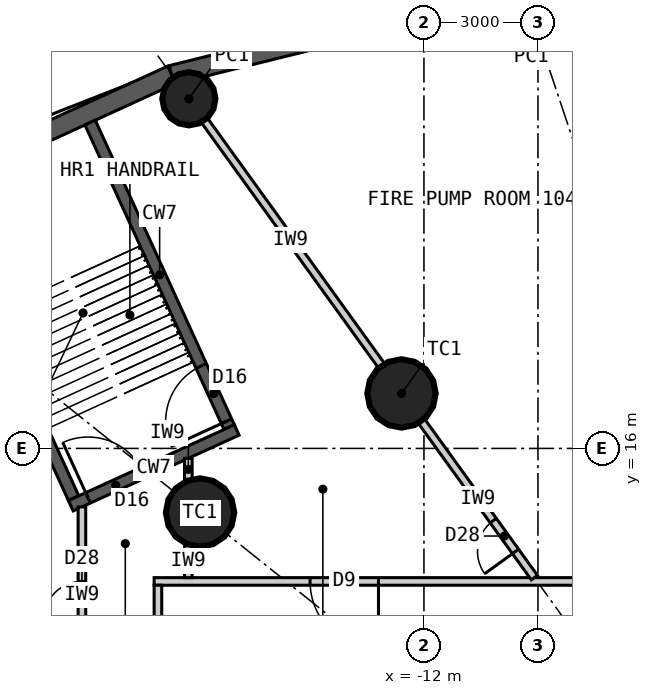
"""IFC4 building model, lengths in metres.
Left out: names, types, materials, properties, quantities, classifications, styles, units other than length and angle.
Written with IfcOpenShell. Run it as: python <this file> out.ifc"""

import sys

from ifc_helpers import new_model, si_unit, direction, frame, frame_2d, origin, origin_2d, place, context, subcontext, project, spatial, rectangle, circle, extrude, element, fill, save


model = new_model("IFC4")
c1 = context("Model", 3, precision=1e-05, world=origin(), true_north=direction((0.0, 1.0)))
c2 = subcontext(c1, "Body", "Model", "MODEL_VIEW")
j1 = project(units=[si_unit("LENGTHUNIT", "METRE"), si_unit("PLANEANGLEUNIT", "RADIAN")], contexts=[c1])
p1 = place(None, origin())
s1 = spatial("IfcSite", under=j1, at=p1, CompositionType="ELEMENT")
p2 = place(p1, origin())
s2 = spatial("IfcBuilding", under=s1, at=p2, CompositionType="ELEMENT")
p3 = place(p2, frame((0.0, 0.0, -6.0)))
s3 = spatial("IfcBuildingStorey", under=s2, at=p3, CompositionType="ELEMENT", Elevation=-6.0)
for number, where, z_axis, x_axis in (
    (1, (-12.591, 17.447, 0.0), (0.0, 0.0, 1.0), (1.0, 0.0, 0.0)),
    (2, (-17.892, 14.313, 0.0), (0.0, 0.0, 1.0), (1.0, 0.0, 0.0)),
):
    element("IfcColumn", number, at=place(p3, frame(where, z_axis=z_axis, x_axis=x_axis)), inside=s3, PredefinedType="COLUMN", context=c2, shape_type="SweptSolid", body=[
        extrude(circle(Radius=0.9, at=origin_2d()), origin(), (0.0, 0.0, 1.0), 6.0),
    ])
p4 = place(p3, frame((-18.186, 25.199, 0.0), z_axis=(0.0, 0.0, 1.0), x_axis=(1.0, 0.0, 0.0)))
e3 = element("IfcColumn", 3, at=p4, inside=s3, PredefinedType="COLUMN", context=c2, shape_type="SweptSolid", body=[
    extrude(circle(Radius=0.7, at=origin_2d()), origin(), (0.0, 0.0, 1.0), 6.0),
])
p5 = place(p3, frame((-9.415, 28.11, 0.0), z_axis=(0.0, 0.0, 1.0), x_axis=(-0.97078133687, -0.239965822533, 0.0)))
e4 = element("IfcWall", 4, at=p5, inside=s3, PredefinedType="SOLIDWALL", context=c2, shape_type="SweptSolid", body=[
    extrude(rectangle(XDim=9.503, YDim=0.5, at=frame_2d((4.752, 0.0))), origin(), (0.0, 0.0, 1.0), 5.75),
])
p6 = place(p3, frame((-18.641, 25.83, 0.0), z_axis=(0.0, 0.0, 1.0), x_axis=(-0.909171365198, -0.416422176047, 0.0)))
e5 = element("IfcWall", 5, at=p6, inside=s3, PredefinedType="SOLIDWALL", context=c2, shape_type="SweptSolid", body=[
    extrude(rectangle(XDim=9.545, YDim=0.5, at=frame_2d((4.772, 0.0))), origin(), (0.0, 0.0, 1.0), 5.75),
])
p7 = place(p3, frame((-19.1, 12.5, 0.0), z_axis=(0.0, 0.0, 1.0), x_axis=(1.0, 0.0, 0.0)))
e6 = element("IfcWall", 6, at=p7, inside=s3, PredefinedType="PARTITIONING", context=c2, shape_type="SweptSolid", body=[
    extrude(rectangle(XDim=38.2, YDim=0.2, at=frame_2d((19.1, 0.0))), origin(), (0.0, 0.0, 1.0), 5.75),
])
p8 = place(p7, frame((25.92, 0.0, 0.0)))
e7 = element("IfcOpeningElement", 7, at=p8, cuts=e6, PredefinedType="OPENING", context=c2, shape_type="SweptSolid", body=[
    extrude(rectangle(XDim=1.8, YDim=2.4, at=frame_2d((0.9, 1.2))), frame((0.0, 0.11, 0.0), z_axis=(0.0, -1.0, 0.0), x_axis=(1.0, 0.0, 0.0)), (0.0, 0.0, 1.0), 0.22),
])
p9 = place(p7, frame((20.31, 0.0, 0.0)))
e8 = element("IfcOpeningElement", 8, at=p9, cuts=e6, PredefinedType="OPENING", context=c2, shape_type="SweptSolid", body=[
    extrude(rectangle(XDim=1.8, YDim=2.4, at=frame_2d((0.9, 1.2))), frame((0.0, 0.11, 0.0), z_axis=(0.0, -1.0, 0.0), x_axis=(1.0, 0.0, 0.0)), (0.0, 0.0, 1.0), 0.22),
])
p10 = place(p7, frame((14.653, 0.0, 0.0)))
e9 = element("IfcOpeningElement", 9, at=p10, cuts=e6, PredefinedType="OPENING", context=c2, shape_type="SweptSolid", body=[
    extrude(rectangle(XDim=1.8, YDim=2.4, at=frame_2d((0.9, 1.2))), frame((0.0, 0.11, 0.0), z_axis=(0.0, -1.0, 0.0), x_axis=(1.0, 0.0, 0.0)), (0.0, 0.0, 1.0), 0.22),
])
p11 = place(p7, frame((4.103, 0.0, 0.0)))
e10 = element("IfcOpeningElement", 10, at=p11, cuts=e6, PredefinedType="OPENING", context=c2, shape_type="SweptSolid", body=[
    extrude(rectangle(XDim=1.8, YDim=2.4, at=frame_2d((0.9, 1.2))), frame((0.0, 0.11, 0.0), z_axis=(0.0, -1.0, 0.0), x_axis=(1.0, 0.0, 0.0)), (0.0, 0.0, 1.0), 0.22),
])
p12 = place(p7, frame((32.82, 0.0, 0.0)))
e11 = element("IfcOpeningElement", 11, at=p12, cuts=e6, PredefinedType="OPENING", context=c2, shape_type="SweptSolid", body=[
    extrude(rectangle(XDim=1.8, YDim=2.4, at=frame_2d((0.9, 1.2))), frame((0.0, 0.11, 0.0), z_axis=(0.0, -1.0, 0.0), x_axis=(1.0, 0.0, 0.0)), (0.0, 0.0, 1.0), 0.22),
])
p13 = place(p3, frame((-19.0, 12.4, 0.0), z_axis=(0.0, 0.0, 1.0), x_axis=(0.0, -1.0, 0.0)))
e12 = element("IfcWall", 12, at=p13, inside=s3, PredefinedType="PARTITIONING", context=c2, shape_type="SweptSolid", body=[
    extrude(rectangle(XDim=24.8, YDim=0.2, at=frame_2d((12.4, 0.0))), origin(), (0.0, 0.0, 1.0), 5.75),
])
p14 = place(p13, frame((5.442, 0.0, 0.0)))
e13 = element("IfcOpeningElement", 13, at=p14, cuts=e12, PredefinedType="OPENING", context=c2, shape_type="SweptSolid", body=[
    extrude(rectangle(XDim=1.0, YDim=2.2, at=frame_2d((0.5, 1.1))), frame((0.0, 0.11, 0.0), z_axis=(0.0, -1.0, 0.0), x_axis=(1.0, 0.0, 0.0)), (0.0, 0.0, 1.0), 0.22),
])
p15 = place(p13, frame((9.853, 0.0, 0.0)))
e14 = element("IfcOpeningElement", 14, at=p15, cuts=e12, PredefinedType="OPENING", context=c2, shape_type="SweptSolid", body=[
    extrude(rectangle(XDim=1.0, YDim=2.1, at=frame_2d((0.5, 1.05))), frame((0.0, 0.11, 0.0), z_axis=(0.0, -1.0, 0.0), x_axis=(1.0, 0.0, 0.0)), (0.0, 0.0, 1.0), 0.22),
])
p16 = place(p13, frame((13.947, 0.0, 0.0)))
e15 = element("IfcOpeningElement", 15, at=p16, cuts=e12, PredefinedType="OPENING", context=c2, shape_type="SweptSolid", body=[
    extrude(rectangle(XDim=1.0, YDim=2.1, at=frame_2d((0.5, 1.05))), frame((0.0, 0.11, 0.0), z_axis=(0.0, -1.0, 0.0), x_axis=(1.0, 0.0, 0.0)), (0.0, 0.0, 1.0), 0.22),
])
p17 = place(p13, frame((18.358, 0.0, 0.0)))
e16 = element("IfcOpeningElement", 16, at=p17, cuts=e12, PredefinedType="OPENING", context=c2, shape_type="SweptSolid", body=[
    extrude(rectangle(XDim=1.0, YDim=2.2, at=frame_2d((0.5, 1.1))), frame((0.0, 0.11, 0.0), z_axis=(0.0, -1.0, 0.0), x_axis=(1.0, 0.0, 0.0)), (0.0, 0.0, 1.0), 0.22),
])
p18 = place(p3, frame((-9.093, 12.6, 0.0), z_axis=(0.0, 0.0, 1.0), x_axis=(-0.58522538525, 0.810870673079, 0.0)))
e17 = element("IfcWall", 17, at=p18, inside=s3, PredefinedType="PARTITIONING", context=c2, shape_type="SweptSolid", body=[
    extrude(rectangle(XDim=5.077, YDim=0.2, at=frame_2d((2.538, 0.0))), origin(), (0.0, 0.0, 1.0), 4.9),
])
p19 = place(p18, frame((0.85, 0.0, 0.0)))
e18 = element("IfcOpeningElement", 18, at=p19, cuts=e17, PredefinedType="OPENING", context=c2, shape_type="SweptSolid", body=[
    extrude(rectangle(XDim=1.0, YDim=2.2, at=frame_2d((0.5, 1.1))), frame((0.0, 0.11, 0.0), z_axis=(0.0, -1.0, 0.0), x_axis=(1.0, 0.0, 0.0)), (0.0, 0.0, 1.0), 0.22),
])
p20 = place(p3, frame((-13.118, 18.176, 0.0), z_axis=(0.0, 0.0, 1.0), x_axis=(-0.585204349301, 0.810885854828, 0.0)))
e19 = element("IfcWall", 19, at=p20, inside=s3, PredefinedType="PARTITIONING", context=c2, shape_type="SweptSolid", body=[
    extrude(rectangle(XDim=8.161, YDim=0.2, at=frame_2d((4.081, 0.0))), origin(), (0.0, 0.0, 1.0), 4.85),
])
p21 = place(p3, frame((-17.125, 16.56, 0.0), z_axis=(0.0, 0.0, 1.0), x_axis=(-0.41534319891, 0.909664788325, 0.0)))
e20 = element("IfcWall", 20, at=p21, inside=s3, PredefinedType="SHEAR", context=c2, shape_type="SweptSolid", body=[
    extrude(rectangle(XDim=8.81, YDim=0.3, at=frame_2d((4.405, 0.0))), origin(), (0.0, 0.0, 1.0), 5.75),
])
p22 = place(p21, frame((0.17, 0.0, 0.0)))
e21 = element("IfcOpeningElement", 21, at=p22, cuts=e20, PredefinedType="OPENING", context=c2, shape_type="SweptSolid", body=[
    extrude(rectangle(XDim=1.6, YDim=2.1, at=frame_2d((0.8, 1.05))), frame((0.0, 0.16, 0.0), z_axis=(0.0, -1.0, 0.0), x_axis=(1.0, 0.0, 0.0)), (0.0, 0.0, 1.0), 0.32),
])
p23 = place(p3, frame((-24.878, 22.705, 0.0), z_axis=(0.0, 0.0, 1.0), x_axis=(0.41534319891, -0.909664788325, 0.0)))
e22 = element("IfcWall", 22, at=p23, inside=s3, PredefinedType="SHEAR", context=c2, shape_type="SweptSolid", body=[
    extrude(rectangle(XDim=8.81, YDim=0.3, at=frame_2d((4.405, 0.0))), origin(), (0.0, 0.0, 1.0), 5.75),
])
p24 = place(p3, frame((-21.293, 14.492, 0.0), z_axis=(0.0, 0.0, 1.0), x_axis=(0.90966669911, 0.415339013975, 0.0)))
e23 = element("IfcWall", 23, at=p24, inside=s3, PredefinedType="SHEAR", context=c2, shape_type="SweptSolid", body=[
    extrude(rectangle(XDim=4.8, YDim=0.3, at=frame_2d((2.4, 0.0))), origin(), (0.0, 0.0, 1.0), 5.75),
])
p25 = place(p24, frame((0.5, 0.0, 0.0)))
e24 = element("IfcOpeningElement", 24, at=p25, cuts=e23, PredefinedType="OPENING", context=c2, shape_type="SweptSolid", body=[
    extrude(rectangle(XDim=1.6, YDim=2.1, at=frame_2d((0.8, 1.05))), frame((0.0, 0.16, 0.0), z_axis=(0.0, -1.0, 0.0), x_axis=(1.0, 0.0, 0.0)), (0.0, 0.0, 1.0), 0.32),
])
p26 = place(p3, frame((-21.0, 14.461, 0.0), z_axis=(0.0, 0.0, 1.0), x_axis=(0.0, -1.0, 0.0)))
e25 = element("IfcWall", 25, at=p26, inside=s3, PredefinedType="PARTITIONING", context=c2, shape_type="SweptSolid", body=[
    extrude(rectangle(XDim=4.651, YDim=0.2, at=frame_2d((2.326, 0.0))), origin(), (0.0, 0.0, 1.0), 5.75),
])
p27 = place(p26, frame((1.961, 0.0, 0.0)))
e26 = element("IfcOpeningElement", 26, at=p27, cuts=e25, PredefinedType="OPENING", context=c2, shape_type="SweptSolid", body=[
    extrude(rectangle(XDim=1.0, YDim=2.2, at=frame_2d((0.5, 1.1))), frame((0.0, 0.11, 0.0), z_axis=(0.0, -1.0, 0.0), x_axis=(1.0, 0.0, 0.0)), (0.0, 0.0, 1.0), 0.22),
])
p28 = place(p3, frame((-18.2, 15.739, 0.0), z_axis=(0.0, 0.0, 1.0), x_axis=(0.0, -1.0, 0.0)))
e27 = element("IfcWall", 27, at=p28, inside=s3, PredefinedType="PARTITIONING", context=c2, shape_type="SweptSolid", body=[
    extrude(rectangle(XDim=0.581, YDim=0.2, at=frame_2d((0.291, 0.0))), origin(), (0.0, 0.0, 1.0), 5.75),
])
p29 = place(p3, frame((-18.2, 13.468, 0.0), z_axis=(0.0, 0.0, 1.0), x_axis=(0.0, -1.0, 0.0)))
e28 = element("IfcWall", 28, at=p29, inside=s3, PredefinedType="PARTITIONING", context=c2, shape_type="SweptSolid", body=[
    extrude(rectangle(XDim=0.868, YDim=0.2, at=frame_2d((0.434, 0.0))), origin(), (0.0, 0.0, 1.0), 5.75),
])
p30 = place(p25, origin())
e29 = element("IfcDoor", 29, at=p30, inside=s3, OperationType="SINGLE_SWING_LEFT", PredefinedType="DOOR", context=c2, shape_type="SweptSolid", body=[
    extrude(rectangle(XDim=1.6, YDim=2.1, at=frame_2d((0.8, 1.05))), frame((0.0, 0.025, 0.0), z_axis=(0.0, -1.0, 0.0), x_axis=(1.0, 0.0, 0.0)), (0.0, 0.0, 1.0), 0.05),
])
fill(e24, e29)
p31 = place(p22, origin())
e30 = element("IfcDoor", 30, at=p31, inside=s3, OperationType="SINGLE_SWING_LEFT", PredefinedType="DOOR", context=c2, shape_type="SweptSolid", body=[
    extrude(rectangle(XDim=1.6, YDim=2.1, at=frame_2d((0.8, 1.05))), frame((0.0, 0.025, 0.0), z_axis=(0.0, -1.0, 0.0), x_axis=(1.0, 0.0, 0.0)), (0.0, 0.0, 1.0), 0.05),
])
fill(e21, e30)
p32 = place(p11, origin())
e31 = element("IfcDoor", 31, at=p32, inside=s3, OperationType="DOUBLE_DOOR_DOUBLE_SWING", PredefinedType="DOOR", context=c2, shape_type="SweptSolid", body=[
    extrude(rectangle(XDim=1.8, YDim=2.4, at=frame_2d((0.9, 1.2))), frame((0.0, 0.025, 0.0), z_axis=(0.0, -1.0, 0.0), x_axis=(1.0, 0.0, 0.0)), (0.0, 0.0, 1.0), 0.05),
])
fill(e10, e31)
p33 = place(p19, origin())
e32 = element("IfcDoor", 32, at=p33, inside=s3, OperationType="SINGLE_SWING_LEFT", PredefinedType="DOOR", context=c2, shape_type="SweptSolid", body=[
    extrude(rectangle(XDim=1.0, YDim=2.2, at=frame_2d((0.5, 1.1))), frame((0.0, 0.025, 0.0), z_axis=(0.0, -1.0, 0.0), x_axis=(1.0, 0.0, 0.0)), (0.0, 0.0, 1.0), 0.05),
])
fill(e18, e32)
p34 = place(p27, origin())
e33 = element("IfcDoor", 33, at=p34, inside=s3, OperationType="SINGLE_SWING_RIGHT", PredefinedType="DOOR", context=c2, shape_type="SweptSolid", body=[
    extrude(rectangle(XDim=1.0, YDim=2.2, at=frame_2d((0.5, 1.1))), frame((0.0, 0.025, 0.0), z_axis=(0.0, -1.0, 0.0), x_axis=(1.0, 0.0, 0.0)), (0.0, 0.0, 1.0), 0.05),
])
fill(e26, e33)
save(model, sys.argv[1])
